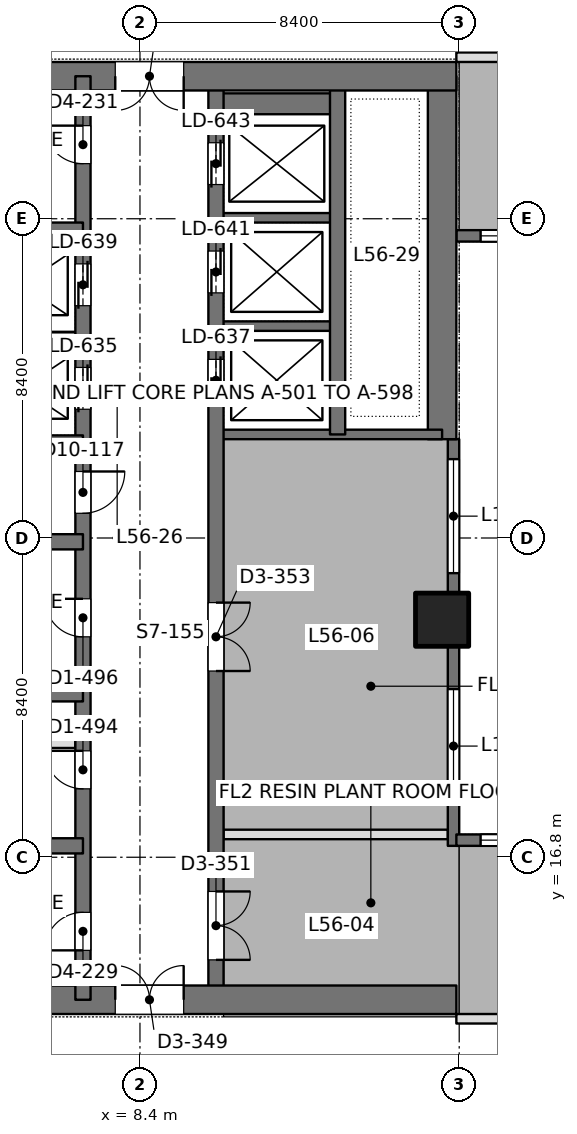
"""IFC4 building model, lengths in metres.
Left out: names, types, materials, properties, quantities, classifications, styles, units other than length and angle.
Written with IfcOpenShell. Run it as: python <this file> out.ifc"""

import sys

from ifc_helpers import new_model, si_unit, direction, frame, frame_2d, origin, origin_2d, place, context, subcontext, project, spatial, rectangle, extrude, element, fill, save


model = new_model("IFC4")
c1 = context("Model", 3, precision=1e-05, world=origin(), true_north=direction((0.0, 1.0)))
c2 = subcontext(c1, "Body", "Model", "MODEL_VIEW")
j1 = project(units=[si_unit("LENGTHUNIT", "METRE"), si_unit("PLANEANGLEUNIT", "RADIAN")], contexts=[c1])
p1 = place(None, origin())
s1 = spatial("IfcSite", under=j1, at=p1, CompositionType="ELEMENT")
p2 = place(p1, origin())
s2 = spatial("IfcBuilding", under=s1, at=p2, CompositionType="ELEMENT")
p3 = place(p2, frame((0.0, 0.0, 244.8)))
s3 = spatial("IfcBuildingStorey", under=s2, at=p3, CompositionType="ELEMENT", Elevation=244.8)
p4 = place(p3, frame((16.35, 23.05, 0.0), z_axis=(0.0, 0.0, 1.0), x_axis=(1.0, 0.0, 0.0)))
e1 = element("IfcColumn", 1, at=p4, inside=s3, PredefinedType="COLUMN", context=c2, shape_type="SweptSolid", body=[
    extrude(rectangle(XDim=1.4, YDim=1.4, at=origin_2d()), origin(), (0.0, 0.0, 1.0), 5.4),
])
p5 = place(p3, frame((-1.125, 13.05, 0.0), z_axis=(0.0, 0.0, 1.0), x_axis=(1.0, 0.0, 0.0)))
e2 = element("IfcWall", 2, at=p5, inside=s3, PredefinedType="SHEAR", context=c2, shape_type="SweptSolid", body=[
    extrude(rectangle(XDim=17.85, YDim=0.75, at=frame_2d((8.925, 0.0))), origin(), (0.0, 0.0, 1.0), 5.4),
])
p6 = place(p5, frame((8.875, 0.0, 0.0)))
e3 = element("IfcOpeningElement", 3, at=p6, cuts=e2, PredefinedType="OPENING", context=c2, shape_type="SweptSolid", body=[
    extrude(rectangle(XDim=1.8, YDim=2.4, at=frame_2d((0.9, 1.2))), frame((0.0, 0.385, 0.0), z_axis=(0.0, -1.0, 0.0), x_axis=(1.0, 0.0, 0.0)), (0.0, 0.0, 1.0), 0.77),
])
p7 = place(p3, frame((-1.125, 37.35, 0.0), z_axis=(0.0, 0.0, 1.0), x_axis=(1.0, 0.0, 0.0)))
e4 = element("IfcWall", 4, at=p7, inside=s3, PredefinedType="SHEAR", context=c2, shape_type="SweptSolid", body=[
    extrude(rectangle(XDim=17.85, YDim=0.75, at=frame_2d((8.925, 0.0))), origin(), (0.0, 0.0, 1.0), 5.4),
])
p8 = place(p7, frame((8.875, 0.0, 0.0)))
e5 = element("IfcOpeningElement", 5, at=p8, cuts=e4, PredefinedType="OPENING", context=c2, shape_type="SweptSolid", body=[
    extrude(rectangle(XDim=1.8, YDim=2.4, at=frame_2d((0.9, 1.2))), frame((0.0, 0.385, 0.0), z_axis=(0.0, -1.0, 0.0), x_axis=(1.0, 0.0, 0.0)), (0.0, 0.0, 1.0), 0.77),
])
p9 = place(p3, frame((16.35, 27.8, 0.0), z_axis=(0.0, 0.0, 1.0), x_axis=(0.0, 1.0, 0.0)))
e6 = element("IfcWall", 6, at=p9, inside=s3, PredefinedType="SHEAR", context=c2, shape_type="SweptSolid", body=[
    extrude(rectangle(XDim=9.55, YDim=0.75, at=frame_2d((4.775, 0.0))), origin(), (0.0, 0.0, 1.0), 5.4),
])
p10 = place(p3, frame((6.9, 13.05, 0.0), z_axis=(0.0, 0.0, 1.0), x_axis=(0.0, 1.0, 0.0)))
e7 = element("IfcWall", 7, at=p10, inside=s3, PredefinedType="SHEAR", context=c2, shape_type="SweptSolid", body=[
    extrude(rectangle(XDim=24.3, YDim=0.4, at=frame_2d((12.15, 0.0))), origin(), (0.0, 0.0, 1.0), 5.4),
])
p11 = place(p10, frame((1.3, 0.0, 0.0)))
e8 = element("IfcOpeningElement", 8, at=p11, cuts=e7, PredefinedType="OPENING", context=c2, shape_type="SweptSolid", body=[
    extrude(rectangle(XDim=1.0, YDim=2.2, at=frame_2d((0.5, 1.1))), frame((0.0, 0.21, 0.0), z_axis=(0.0, -1.0, 0.0), x_axis=(1.0, 0.0, 0.0)), (0.0, 0.0, 1.0), 0.42),
])
p12 = place(p10, frame((22.0, 0.0, 0.0)))
e9 = element("IfcOpeningElement", 9, at=p12, cuts=e7, PredefinedType="OPENING", context=c2, shape_type="SweptSolid", body=[
    extrude(rectangle(XDim=1.0, YDim=2.2, at=frame_2d((0.5, 1.1))), frame((0.0, 0.21, 0.0), z_axis=(0.0, -1.0, 0.0), x_axis=(1.0, 0.0, 0.0)), (0.0, 0.0, 1.0), 0.42),
])
p13 = place(p10, frame((5.55, 0.0, 0.0)))
e10 = element("IfcOpeningElement", 10, at=p13, cuts=e7, PredefinedType="OPENING", context=c2, shape_type="SweptSolid", body=[
    extrude(rectangle(XDim=1.0, YDim=2.2, at=frame_2d((0.5, 1.1))), frame((0.0, 0.21, 0.0), z_axis=(0.0, -1.0, 0.0), x_axis=(1.0, 0.0, 0.0)), (0.0, 0.0, 1.0), 0.42),
])
p14 = place(p10, frame((9.55, 0.0, 0.0)))
e11 = element("IfcOpeningElement", 11, at=p14, cuts=e7, PredefinedType="OPENING", context=c2, shape_type="SweptSolid", body=[
    extrude(rectangle(XDim=1.0, YDim=2.2, at=frame_2d((0.5, 1.1))), frame((0.0, 0.21, 0.0), z_axis=(0.0, -1.0, 0.0), x_axis=(1.0, 0.0, 0.0)), (0.0, 0.0, 1.0), 0.42),
])
p15 = place(p10, frame((12.8, 0.0, 0.0)))
e12 = element("IfcOpeningElement", 12, at=p15, cuts=e7, PredefinedType="OPENING", context=c2, shape_type="SweptSolid", body=[
    extrude(rectangle(XDim=1.1, YDim=2.2, at=frame_2d((0.55, 1.1))), frame((0.0, 0.21, 0.0), z_axis=(0.0, -1.0, 0.0), x_axis=(1.0, 0.0, 0.0)), (0.0, 0.0, 1.0), 0.42),
])
p16 = place(p10, frame((15.538, 0.0, 0.0)))
e13 = element("IfcOpeningElement", 13, at=p16, cuts=e7, PredefinedType="OPENING", context=c2, shape_type="SweptSolid", body=[
    extrude(rectangle(XDim=1.1, YDim=2.2, at=frame_2d((0.55, 1.1))), frame((0.0, 0.21, 0.0), z_axis=(0.0, -1.0, 0.0), x_axis=(1.0, 0.0, 0.0)), (0.0, 0.0, 1.0), 0.42),
])
p17 = place(p10, frame((18.262, 0.0, 0.0)))
e14 = element("IfcOpeningElement", 14, at=p17, cuts=e7, PredefinedType="OPENING", context=c2, shape_type="SweptSolid", body=[
    extrude(rectangle(XDim=1.1, YDim=2.2, at=frame_2d((0.55, 1.1))), frame((0.0, 0.21, 0.0), z_axis=(0.0, -1.0, 0.0), x_axis=(1.0, 0.0, 0.0)), (0.0, 0.0, 1.0), 0.42),
])
p18 = place(p3, frame((10.4, 13.05, 0.0), z_axis=(0.0, 0.0, 1.0), x_axis=(0.0, 1.0, 0.0)))
e15 = element("IfcWall", 15, at=p18, inside=s3, PredefinedType="SHEAR", context=c2, shape_type="SweptSolid", body=[
    extrude(rectangle(XDim=24.3, YDim=0.4, at=frame_2d((12.15, 0.0))), origin(), (0.0, 0.0, 1.0), 5.4),
])
p19 = place(p18, frame((15.75, 0.0, 0.0)))
e16 = element("IfcOpeningElement", 16, at=p19, cuts=e15, PredefinedType="OPENING", context=c2, shape_type="SweptSolid", body=[
    extrude(rectangle(XDim=1.1, YDim=2.2, at=frame_2d((0.55, 1.1))), frame((0.0, 0.21, 0.0), z_axis=(0.0, -1.0, 0.0), x_axis=(1.0, 0.0, 0.0)), (0.0, 0.0, 1.0), 0.42),
])
p20 = place(p18, frame((18.6, 0.0, 0.0)))
e17 = element("IfcOpeningElement", 17, at=p20, cuts=e15, PredefinedType="OPENING", context=c2, shape_type="SweptSolid", body=[
    extrude(rectangle(XDim=1.1, YDim=2.2, at=frame_2d((0.55, 1.1))), frame((0.0, 0.21, 0.0), z_axis=(0.0, -1.0, 0.0), x_axis=(1.0, 0.0, 0.0)), (0.0, 0.0, 1.0), 0.42),
])
p21 = place(p18, frame((21.45, 0.0, 0.0)))
e18 = element("IfcOpeningElement", 18, at=p21, cuts=e15, PredefinedType="OPENING", context=c2, shape_type="SweptSolid", body=[
    extrude(rectangle(XDim=1.1, YDim=2.2, at=frame_2d((0.55, 1.1))), frame((0.0, 0.21, 0.0), z_axis=(0.0, -1.0, 0.0), x_axis=(1.0, 0.0, 0.0)), (0.0, 0.0, 1.0), 0.42),
])
p22 = place(p18, frame((8.65, 0.0, 0.0)))
e19 = element("IfcOpeningElement", 19, at=p22, cuts=e15, PredefinedType="OPENING", context=c2, shape_type="SweptSolid", body=[
    extrude(rectangle(XDim=1.8, YDim=2.4, at=frame_2d((0.9, 1.2))), frame((0.0, 0.21, 0.0), z_axis=(0.0, -1.0, 0.0), x_axis=(1.0, 0.0, 0.0)), (0.0, 0.0, 1.0), 0.42),
])
p23 = place(p18, frame((1.05, 0.0, 0.0)))
e20 = element("IfcOpeningElement", 20, at=p23, cuts=e15, PredefinedType="OPENING", context=c2, shape_type="SweptSolid", body=[
    extrude(rectangle(XDim=1.8, YDim=2.4, at=frame_2d((0.9, 1.2))), frame((0.0, 0.21, 0.0), z_axis=(0.0, -1.0, 0.0), x_axis=(1.0, 0.0, 0.0)), (0.0, 0.0, 1.0), 0.42),
])
p24 = place(p3, frame((13.6, 27.925, 0.0), z_axis=(0.0, 0.0, 1.0), x_axis=(0.0, 1.0, 0.0)))
e21 = element("IfcWall", 21, at=p24, inside=s3, PredefinedType="SHEAR", context=c2, shape_type="SweptSolid", body=[
    extrude(rectangle(XDim=9.425, YDim=0.4, at=frame_2d((4.712, 0.0))), origin(), (0.0, 0.0, 1.0), 5.4),
])
for number, where, z_axis, x_axis in (
    (22, (-0.75, 17.1, 0.0), (0.0, 0.0, 1.0), (1.0, 0.0, 0.0)),
    (23, (-0.75, 21.1, 0.0), (0.0, 0.0, 1.0), (1.0, 0.0, 0.0)),
    (24, (-0.75, 25.1, 0.0), (0.0, 0.0, 1.0), (1.0, 0.0, 0.0)),
    (25, (-0.75, 27.7, 0.0), (0.0, 0.0, 1.0), (1.0, 0.0, 0.0)),
    (26, (-0.75, 33.3, 0.0), (0.0, 0.0, 1.0), (1.0, 0.0, 0.0)),
):
    element("IfcWall", number, at=place(p3, frame(where, z_axis=z_axis, x_axis=x_axis)), inside=s3, PredefinedType="SHEAR", context=c2, shape_type="SweptSolid", body=[
        extrude(rectangle(XDim=7.65, YDim=0.4, at=frame_2d((3.825, 0.0))), origin(), (0.0, 0.0, 1.0), 5.4),
    ])
p25 = place(p3, frame((3.7, 30.5, 0.0), z_axis=(0.0, 0.0, 1.0), x_axis=(1.0, 0.0, 0.0)))
e27 = element("IfcWall", 27, at=p25, inside=s3, PredefinedType="SHEAR", context=c2, shape_type="SweptSolid", body=[
    extrude(rectangle(XDim=3.2, YDim=0.25, at=frame_2d((1.6, 0.0))), origin(), (0.0, 0.0, 1.0), 5.4),
])
p26 = place(p3, frame((10.4, 27.925, 0.0), z_axis=(0.0, 0.0, 1.0), x_axis=(1.0, 0.0, 0.0)))
e28 = element("IfcWall", 28, at=p26, inside=s3, PredefinedType="SHEAR", context=c2, shape_type="SweptSolid", body=[
    extrude(rectangle(XDim=5.95, YDim=0.25, at=frame_2d((2.975, 0.0))), origin(), (0.0, 0.0, 1.0), 5.4),
])
for number, where, z_axis, x_axis in (
    (29, (10.4, 30.775, 0.0), (0.0, 0.0, 1.0), (1.0, 0.0, 0.0)),
    (30, (10.4, 33.625, 0.0), (0.0, 0.0, 1.0), (1.0, 0.0, 0.0)),
):
    element("IfcWall", number, at=place(p3, frame(where, z_axis=z_axis, x_axis=x_axis)), inside=s3, PredefinedType="SHEAR", context=c2, shape_type="SweptSolid", body=[
        extrude(rectangle(XDim=3.2, YDim=0.25, at=frame_2d((1.6, 0.0))), origin(), (0.0, 0.0, 1.0), 5.4),
    ])
p27 = place(p3, frame((10.4, 36.625, 0.0), z_axis=(0.0, 0.0, 1.0), x_axis=(1.0, 0.0, 0.0)))
e31 = element("IfcWall", 31, at=p27, inside=s3, PredefinedType="SHEAR", context=c2, shape_type="SweptSolid", body=[
    extrude(rectangle(XDim=3.2, YDim=0.55, at=frame_2d((1.6, 0.0))), origin(), (0.0, 0.0, 1.0), 5.4),
])
p28 = place(p3, frame((16.65, 17.1, 0.0), z_axis=(0.0, 0.0, 1.0), x_axis=(0.0, 1.0, 0.0)))
e32 = element("IfcWall", 32, at=p28, inside=s3, PredefinedType="SOLIDWALL", context=c2, shape_type="SweptSolid", body=[
    extrude(rectangle(XDim=10.7, YDim=0.3, at=frame_2d((5.35, 0.0))), origin(), (0.0, 0.0, 1.0), 5.25),
])
p29 = place(p28, frame((1.125, 0.0, 1.2)))
e33 = element("IfcOpeningElement", 33, at=p29, cuts=e32, PredefinedType="OPENING", context=c2, shape_type="SweptSolid", body=[
    extrude(rectangle(XDim=3.0, YDim=2.4, at=frame_2d((1.5, 1.2))), frame((0.0, 0.16, 0.0), z_axis=(0.0, -1.0, 0.0), x_axis=(1.0, 0.0, 0.0)), (0.0, 0.0, 1.0), 0.32),
])
p30 = place(p28, frame((7.175, 0.0, 1.2)))
e34 = element("IfcOpeningElement", 34, at=p30, cuts=e32, PredefinedType="OPENING", context=c2, shape_type="SweptSolid", body=[
    extrude(rectangle(XDim=3.0, YDim=2.4, at=frame_2d((1.5, 1.2))), frame((0.0, 0.16, 0.0), z_axis=(0.0, -1.0, 0.0), x_axis=(1.0, 0.0, 0.0)), (0.0, 0.0, 1.0), 0.32),
])
p31 = place(p3, frame((16.725, 17.25, 0.0), z_axis=(0.0, 0.0, 1.0), x_axis=(1.0, 0.0, 0.0)))
e35 = element("IfcWall", 35, at=p31, inside=s3, PredefinedType="SOLIDWALL", context=c2, shape_type="SweptSolid", body=[
    extrude(rectangle(XDim=7.975, YDim=0.3, at=frame_2d((3.987, 0.0))), origin(), (0.0, 0.0, 1.0), 5.25),
])
p32 = place(p31, frame((0.637, 0.0, 1.2)))
e36 = element("IfcOpeningElement", 36, at=p32, cuts=e35, PredefinedType="OPENING", context=c2, shape_type="SweptSolid", body=[
    extrude(rectangle(XDim=3.0, YDim=2.4, at=frame_2d((1.5, 1.2))), frame((0.0, 0.16, 0.0), z_axis=(0.0, -1.0, 0.0), x_axis=(1.0, 0.0, 0.0)), (0.0, 0.0, 1.0), 0.32),
])
p33 = place(p31, frame((4.837, 0.0, 1.2)))
e37 = element("IfcOpeningElement", 37, at=p33, cuts=e35, PredefinedType="OPENING", context=c2, shape_type="SweptSolid", body=[
    extrude(rectangle(XDim=3.0, YDim=2.4, at=frame_2d((1.5, 1.2))), frame((0.0, 0.16, 0.0), z_axis=(0.0, -1.0, 0.0), x_axis=(1.0, 0.0, 0.0)), (0.0, 0.0, 1.0), 0.32),
])
p34 = place(p3, frame((16.725, 33.15, 0.0), z_axis=(0.0, 0.0, 1.0), x_axis=(1.0, 0.0, 0.0)))
e38 = element("IfcWall", 38, at=p34, inside=s3, PredefinedType="SOLIDWALL", context=c2, shape_type="SweptSolid", body=[
    extrude(rectangle(XDim=7.975, YDim=0.3, at=frame_2d((3.987, 0.0))), origin(), (0.0, 0.0, 1.0), 5.25),
])
p35 = place(p34, frame((0.637, 0.0, 1.2)))
e39 = element("IfcOpeningElement", 39, at=p35, cuts=e38, PredefinedType="OPENING", context=c2, shape_type="SweptSolid", body=[
    extrude(rectangle(XDim=3.0, YDim=2.4, at=frame_2d((1.5, 1.2))), frame((0.0, 0.16, 0.0), z_axis=(0.0, -1.0, 0.0), x_axis=(1.0, 0.0, 0.0)), (0.0, 0.0, 1.0), 0.32),
])
p36 = place(p34, frame((4.837, 0.0, 1.2)))
e40 = element("IfcOpeningElement", 40, at=p36, cuts=e38, PredefinedType="OPENING", context=c2, shape_type="SweptSolid", body=[
    extrude(rectangle(XDim=3.0, YDim=2.4, at=frame_2d((1.5, 1.2))), frame((0.0, 0.16, 0.0), z_axis=(0.0, -1.0, 0.0), x_axis=(1.0, 0.0, 0.0)), (0.0, 0.0, 1.0), 0.32),
])
p37 = place(p3, frame((10.598, 17.4, 0.0), z_axis=(0.0, 0.0, 1.0), x_axis=(1.0, 0.0, 0.0)))
e41 = element("IfcWall", 41, at=p37, inside=s3, PredefinedType="PARTITIONING", context=c2, shape_type="SweptSolid", body=[
    extrude(rectangle(XDim=5.904, YDim=0.25, at=frame_2d((2.952, 0.0))), origin(), (0.0, 0.0, 1.0), 4.7),
])
p38 = place(p3, frame((16.725, 12.55, 0.0), z_axis=(0.0, 0.0, 1.0), x_axis=(1.0, 0.0, 0.0)))
e42 = element("IfcWall", 42, at=p38, inside=s3, PredefinedType="PARTITIONING", context=c2, shape_type="SweptSolid", body=[
    extrude(rectangle(XDim=16.95, YDim=0.25, at=frame_2d((8.475, 0.0))), origin(), (0.0, 0.0, 1.0), 4.7),
])
p39 = place(p38, frame((7.475, 0.0, 0.0)))
e43 = element("IfcOpeningElement", 43, at=p39, cuts=e42, PredefinedType="OPENING", context=c2, shape_type="SweptSolid", body=[
    extrude(rectangle(XDim=2.0, YDim=2.4, at=frame_2d((1.0, 1.2))), frame((0.0, 0.135, 0.0), z_axis=(0.0, -1.0, 0.0), x_axis=(1.0, 0.0, 0.0)), (0.0, 0.0, 1.0), 0.27),
])
p40 = place(p3, frame((16.725, 37.85, 0.0), z_axis=(0.0, 0.0, 1.0), x_axis=(1.0, 0.0, 0.0)))
e44 = element("IfcWall", 44, at=p40, inside=s3, PredefinedType="PARTITIONING", context=c2, shape_type="SweptSolid", body=[
    extrude(rectangle(XDim=16.95, YDim=0.25, at=frame_2d((8.475, 0.0))), origin(), (0.0, 0.0, 1.0), 4.7),
])
p41 = place(p40, frame((7.475, 0.0, 0.0)))
e45 = element("IfcOpeningElement", 45, at=p41, cuts=e44, PredefinedType="OPENING", context=c2, shape_type="SweptSolid", body=[
    extrude(rectangle(XDim=2.0, YDim=2.4, at=frame_2d((1.0, 1.2))), frame((0.0, 0.135, 0.0), z_axis=(0.0, -1.0, 0.0), x_axis=(1.0, 0.0, 0.0)), (0.0, 0.0, 1.0), 0.27),
])
p42 = place(p3, frame((0.025, 19.8, 0.0), z_axis=(0.0, 0.0, 1.0), x_axis=(1.0, 0.0, 0.0)))
e46 = element("IfcWall", 46, at=p42, inside=s3, PredefinedType="PARTITIONING", context=c2, shape_type="SweptSolid", body=[
    extrude(rectangle(XDim=6.675, YDim=0.25, at=frame_2d((3.337, 0.0))), origin(), (0.0, 0.0, 1.0), 5.2),
])
p43 = place(p42, frame((2.913, 0.0, 0.0)))
e47 = element("IfcOpeningElement", 47, at=p43, cuts=e46, PredefinedType="OPENING", context=c2, shape_type="SweptSolid", body=[
    extrude(rectangle(XDim=0.9, YDim=2.2, at=frame_2d((0.45, 1.1))), frame((0.0, 0.135, 0.0), z_axis=(0.0, -1.0, 0.0), x_axis=(1.0, 0.0, 0.0)), (0.0, 0.0, 1.0), 0.27),
])
p44 = place(p29, origin())
e48 = element("IfcWindow", 48, at=p44, inside=s3, PartitioningType="SINGLE_PANEL", PredefinedType="USERDEFINED", context=c2, shape_type="SweptSolid", body=[
    extrude(rectangle(XDim=3.0, YDim=2.4, at=frame_2d((1.5, 1.2))), frame((0.0, 0.03, 0.0), z_axis=(0.0, -1.0, 0.0), x_axis=(1.0, 0.0, 0.0)), (0.0, 0.0, 1.0), 0.06),
])
fill(e33, e48)
p45 = place(p30, origin())
e49 = element("IfcWindow", 49, at=p45, inside=s3, PartitioningType="SINGLE_PANEL", PredefinedType="USERDEFINED", context=c2, shape_type="SweptSolid", body=[
    extrude(rectangle(XDim=3.0, YDim=2.4, at=frame_2d((1.5, 1.2))), frame((0.0, 0.03, 0.0), z_axis=(0.0, -1.0, 0.0), x_axis=(1.0, 0.0, 0.0)), (0.0, 0.0, 1.0), 0.06),
])
fill(e34, e49)
p46 = place(p32, origin())
e50 = element("IfcWindow", 50, at=p46, inside=s3, PartitioningType="SINGLE_PANEL", PredefinedType="USERDEFINED", context=c2, shape_type="SweptSolid", body=[
    extrude(rectangle(XDim=3.0, YDim=2.4, at=frame_2d((1.5, 1.2))), frame((0.0, 0.03, 0.0), z_axis=(0.0, -1.0, 0.0), x_axis=(1.0, 0.0, 0.0)), (0.0, 0.0, 1.0), 0.06),
])
fill(e36, e50)
p47 = place(p35, origin())
e51 = element("IfcWindow", 51, at=p47, inside=s3, PartitioningType="SINGLE_PANEL", PredefinedType="USERDEFINED", context=c2, shape_type="SweptSolid", body=[
    extrude(rectangle(XDim=3.0, YDim=2.4, at=frame_2d((1.5, 1.2))), frame((0.0, 0.03, 0.0), z_axis=(0.0, -1.0, 0.0), x_axis=(1.0, 0.0, 0.0)), (0.0, 0.0, 1.0), 0.06),
])
fill(e39, e51)
p48 = place(p6, origin())
e52 = element("IfcDoor", 52, at=p48, inside=s3, OperationType="DOUBLE_DOOR_SINGLE_SWING", PredefinedType="DOOR", context=c2, shape_type="SweptSolid", body=[
    extrude(rectangle(XDim=1.8, YDim=2.4, at=frame_2d((0.9, 1.2))), frame((0.0, 0.025, 0.0), z_axis=(0.0, -1.0, 0.0), x_axis=(1.0, 0.0, 0.0)), (0.0, 0.0, 1.0), 0.05),
])
fill(e3, e52)
p49 = place(p8, frame((1.8, 0.0, 0.0), z_axis=(0.0, 0.0, 1.0), x_axis=(-1.0, 0.0, 0.0)))
e53 = element("IfcDoor", 53, at=p49, inside=s3, OperationType="DOUBLE_DOOR_SINGLE_SWING", PredefinedType="DOOR", context=c2, shape_type="SweptSolid", body=[
    extrude(rectangle(XDim=1.8, YDim=2.4, at=frame_2d((0.9, 1.2))), frame((0.0, 0.025, 0.0), z_axis=(0.0, -1.0, 0.0), x_axis=(1.0, 0.0, 0.0)), (0.0, 0.0, 1.0), 0.05),
])
fill(e5, e53)
p50 = place(p11, origin())
e54 = element("IfcDoor", 54, at=p50, inside=s3, OperationType="SINGLE_SWING_LEFT", PredefinedType="DOOR", context=c2, shape_type="SweptSolid", body=[
    extrude(rectangle(XDim=1.0, YDim=2.2, at=frame_2d((0.5, 1.1))), frame((0.0, 0.025, 0.0), z_axis=(0.0, -1.0, 0.0), x_axis=(1.0, 0.0, 0.0)), (0.0, 0.0, 1.0), 0.05),
])
fill(e8, e54)
p51 = place(p12, origin())
e55 = element("IfcDoor", 55, at=p51, inside=s3, OperationType="SINGLE_SWING_RIGHT", PredefinedType="DOOR", context=c2, shape_type="SweptSolid", body=[
    extrude(rectangle(XDim=1.0, YDim=2.2, at=frame_2d((0.5, 1.1))), frame((0.0, 0.025, 0.0), z_axis=(0.0, -1.0, 0.0), x_axis=(1.0, 0.0, 0.0)), (0.0, 0.0, 1.0), 0.05),
])
fill(e9, e55)
p52 = place(p13, origin())
e56 = element("IfcDoor", 56, at=p52, inside=s3, OperationType="SINGLE_SWING_RIGHT", PredefinedType="DOOR", context=c2, shape_type="SweptSolid", body=[
    extrude(rectangle(XDim=1.0, YDim=2.2, at=frame_2d((0.5, 1.1))), frame((0.0, 0.025, 0.0), z_axis=(0.0, -1.0, 0.0), x_axis=(1.0, 0.0, 0.0)), (0.0, 0.0, 1.0), 0.05),
])
fill(e10, e56)
p53 = place(p14, origin())
e57 = element("IfcDoor", 57, at=p53, inside=s3, OperationType="SINGLE_SWING_RIGHT", PredefinedType="DOOR", context=c2, shape_type="SweptSolid", body=[
    extrude(rectangle(XDim=1.0, YDim=2.2, at=frame_2d((0.5, 1.1))), frame((0.0, 0.025, 0.0), z_axis=(0.0, -1.0, 0.0), x_axis=(1.0, 0.0, 0.0)), (0.0, 0.0, 1.0), 0.05),
])
fill(e11, e57)
p54 = place(p15, frame((1.1, 0.0, 0.0), z_axis=(0.0, 0.0, 1.0), x_axis=(-1.0, 0.0, 0.0)))
e58 = element("IfcDoor", 58, at=p54, inside=s3, OperationType="SINGLE_SWING_LEFT", PredefinedType="DOOR", context=c2, shape_type="SweptSolid", body=[
    extrude(rectangle(XDim=1.1, YDim=2.2, at=frame_2d((0.55, 1.1))), frame((0.0, 0.025, 0.0), z_axis=(0.0, -1.0, 0.0), x_axis=(1.0, 0.0, 0.0)), (0.0, 0.0, 1.0), 0.05),
])
fill(e12, e58)
p55 = place(p19, origin())
e59 = element("IfcDoor", 59, at=p55, inside=s3, OperationType="DOUBLE_DOOR_SLIDING", PredefinedType="DOOR", context=c2, shape_type="SweptSolid", body=[
    extrude(rectangle(XDim=1.1, YDim=2.2, at=frame_2d((0.55, 1.1))), frame((0.0, 0.025, 0.0), z_axis=(0.0, -1.0, 0.0), x_axis=(1.0, 0.0, 0.0)), (0.0, 0.0, 1.0), 0.05),
])
fill(e16, e59)
p56 = place(p20, origin())
e60 = element("IfcDoor", 60, at=p56, inside=s3, OperationType="DOUBLE_DOOR_SLIDING", PredefinedType="DOOR", context=c2, shape_type="SweptSolid", body=[
    extrude(rectangle(XDim=1.1, YDim=2.2, at=frame_2d((0.55, 1.1))), frame((0.0, 0.025, 0.0), z_axis=(0.0, -1.0, 0.0), x_axis=(1.0, 0.0, 0.0)), (0.0, 0.0, 1.0), 0.05),
])
fill(e17, e60)
p57 = place(p21, origin())
e61 = element("IfcDoor", 61, at=p57, inside=s3, OperationType="DOUBLE_DOOR_SLIDING", PredefinedType="DOOR", context=c2, shape_type="SweptSolid", body=[
    extrude(rectangle(XDim=1.1, YDim=2.2, at=frame_2d((0.55, 1.1))), frame((0.0, 0.025, 0.0), z_axis=(0.0, -1.0, 0.0), x_axis=(1.0, 0.0, 0.0)), (0.0, 0.0, 1.0), 0.05),
])
fill(e18, e61)
p58 = place(p16, origin())
e62 = element("IfcDoor", 62, at=p58, inside=s3, OperationType="DOUBLE_DOOR_SLIDING", PredefinedType="DOOR", context=c2, shape_type="SweptSolid", body=[
    extrude(rectangle(XDim=1.1, YDim=2.2, at=frame_2d((0.55, 1.1))), frame((0.0, 0.025, 0.0), z_axis=(0.0, -1.0, 0.0), x_axis=(1.0, 0.0, 0.0)), (0.0, 0.0, 1.0), 0.05),
])
fill(e13, e62)
p59 = place(p17, origin())
e63 = element("IfcDoor", 63, at=p59, inside=s3, OperationType="DOUBLE_DOOR_SLIDING", PredefinedType="DOOR", context=c2, shape_type="SweptSolid", body=[
    extrude(rectangle(XDim=1.1, YDim=2.2, at=frame_2d((0.55, 1.1))), frame((0.0, 0.025, 0.0), z_axis=(0.0, -1.0, 0.0), x_axis=(1.0, 0.0, 0.0)), (0.0, 0.0, 1.0), 0.05),
])
fill(e14, e63)
p60 = place(p22, frame((1.8, 0.0, 0.0), z_axis=(0.0, 0.0, 1.0), x_axis=(-1.0, 0.0, 0.0)))
e64 = element("IfcDoor", 64, at=p60, inside=s3, OperationType="DOUBLE_DOOR_SINGLE_SWING", PredefinedType="DOOR", context=c2, shape_type="SweptSolid", body=[
    extrude(rectangle(XDim=1.8, YDim=2.4, at=frame_2d((0.9, 1.2))), frame((0.0, 0.025, 0.0), z_axis=(0.0, -1.0, 0.0), x_axis=(1.0, 0.0, 0.0)), (0.0, 0.0, 1.0), 0.05),
])
fill(e19, e64)
p61 = place(p23, frame((1.8, 0.0, 0.0), z_axis=(0.0, 0.0, 1.0), x_axis=(-1.0, 0.0, 0.0)))
e65 = element("IfcDoor", 65, at=p61, inside=s3, OperationType="DOUBLE_DOOR_SINGLE_SWING", PredefinedType="DOOR", context=c2, shape_type="SweptSolid", body=[
    extrude(rectangle(XDim=1.8, YDim=2.4, at=frame_2d((0.9, 1.2))), frame((0.0, 0.025, 0.0), z_axis=(0.0, -1.0, 0.0), x_axis=(1.0, 0.0, 0.0)), (0.0, 0.0, 1.0), 0.05),
])
fill(e20, e65)
save(model, sys.argv[1])
